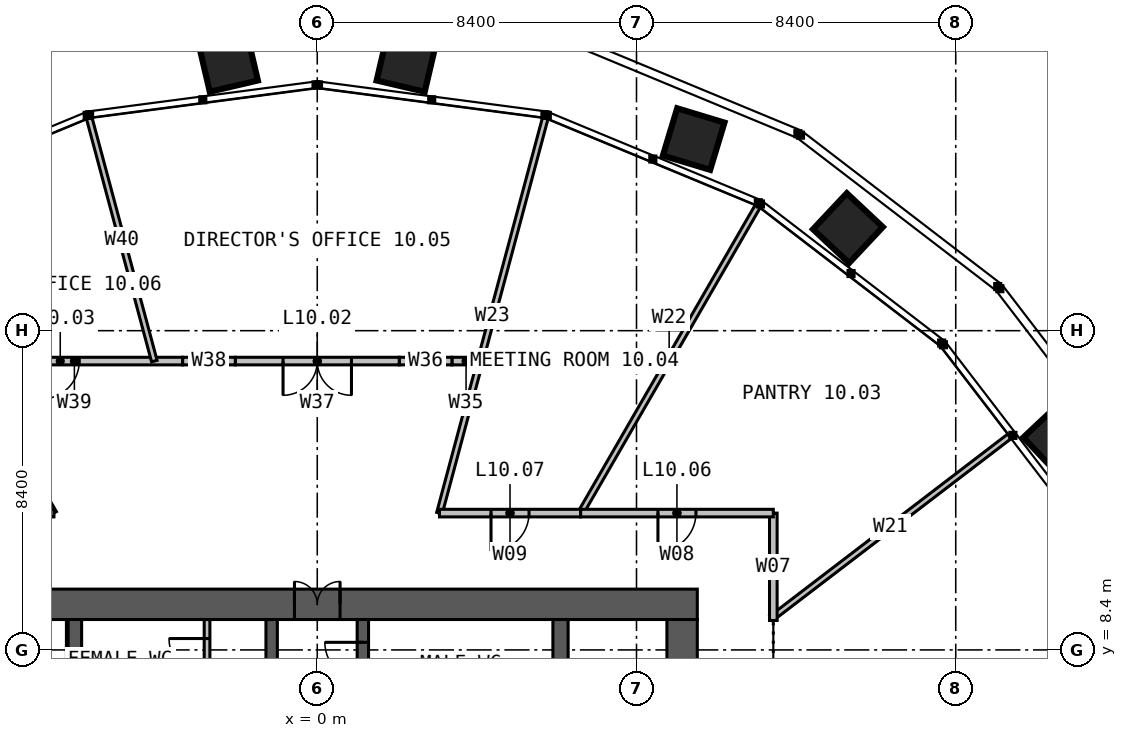
"""IFC4 building model, lengths in metres.
Left out: names, types, materials, properties, quantities, classifications, styles, units other than length and angle.
Written with IfcOpenShell. Run it as: python <this file> out.ifc"""

import sys

from ifc_helpers import new_model, si_unit, direction, frame, frame_2d, origin, place, context, subcontext, project, spatial, rectangle, extrude, element, fill, save


model = new_model("IFC4")
c1 = context("Model", 3, precision=1e-05, world=origin(), true_north=direction((0.0, 1.0)))
c2 = subcontext(c1, "Body", "Model", "MODEL_VIEW")
j1 = project(units=[si_unit("LENGTHUNIT", "METRE"), si_unit("PLANEANGLEUNIT", "RADIAN")], contexts=[c1])
p1 = place(None, origin())
s1 = spatial("IfcSite", under=j1, at=p1, CompositionType="ELEMENT")
p2 = place(p1, origin())
s2 = spatial("IfcBuilding", under=s1, at=p2, CompositionType="ELEMENT")
p3 = place(p2, frame((0.0, 0.0, 45.0)))
s3 = spatial("IfcBuildingStorey", under=s2, at=p3, CompositionType="ELEMENT", Elevation=45.0)
p4 = place(p3, frame((-10.0, 9.6, 0.0), z_axis=(0.0, 0.0, 1.0), x_axis=(1.0, 0.0, 0.0)))
e1 = element("IfcWall", 1, at=p4, inside=s3, PredefinedType="SOLIDWALL", context=c2, shape_type="SweptSolid", body=[
    extrude(rectangle(XDim=20.0, YDim=0.8, at=frame_2d((10.0, 0.0))), origin(), (0.0, 0.0, 1.0), 4.0),
])
p5 = place(p4, frame((9.4, 0.0, 0.0)))
e2 = element("IfcOpeningElement", 2, at=p5, cuts=e1, PredefinedType="OPENING", context=c2, shape_type="SweptSolid", body=[
    extrude(rectangle(XDim=1.2, YDim=2.2, at=frame_2d((0.6, 1.1))), frame((0.0, 0.41, 0.0), z_axis=(0.0, -1.0, 0.0), x_axis=(1.0, 0.0, 0.0)), (0.0, 0.0, 1.0), 0.82),
])
p6 = place(p3, frame((9.6, -9.2, 0.0), z_axis=(0.0, 0.0, 1.0), x_axis=(0.0, 1.0, 0.0)))
e3 = element("IfcWall", 3, at=p6, inside=s3, PredefinedType="SOLIDWALL", context=c2, shape_type="SweptSolid", body=[
    extrude(rectangle(XDim=18.4, YDim=0.8, at=frame_2d((9.2, 0.0))), origin(), (0.0, 0.0, 1.0), 4.0),
])
p7 = place(p3, frame((-6.4, -9.2, 0.0), z_axis=(0.0, 0.0, 1.0), x_axis=(0.0, 1.0, 0.0)))
e4 = element("IfcWall", 4, at=p7, inside=s3, PredefinedType="SOLIDWALL", context=c2, shape_type="SweptSolid", body=[
    extrude(rectangle(XDim=18.4, YDim=0.4, at=frame_2d((9.2, 0.0))), origin(), (0.0, 0.0, 1.0), 4.0),
])
p8 = place(p7, frame((8.7, 0.0, 0.0)))
e5 = element("IfcOpeningElement", 5, at=p8, cuts=e4, PredefinedType="OPENING", context=c2, shape_type="SweptSolid", body=[
    extrude(rectangle(XDim=1.0, YDim=2.2, at=frame_2d((0.5, 1.1))), frame((0.0, 0.21, 0.0), z_axis=(0.0, -1.0, 0.0), x_axis=(1.0, 0.0, 0.0)), (0.0, 0.0, 1.0), 0.42),
])
p9 = place(p3, frame((6.4, 9.2, 0.0), z_axis=(0.0, 0.0, 1.0), x_axis=(0.0, -1.0, 0.0)))
e6 = element("IfcWall", 6, at=p9, inside=s3, PredefinedType="SOLIDWALL", context=c2, shape_type="SweptSolid", body=[
    extrude(rectangle(XDim=18.4, YDim=0.4, at=frame_2d((9.2, 0.0))), origin(), (0.0, 0.0, 1.0), 4.0),
])
p10 = place(p9, frame((8.7, 0.0, 0.0)))
e7 = element("IfcOpeningElement", 7, at=p10, cuts=e6, PredefinedType="OPENING", context=c2, shape_type="SweptSolid", body=[
    extrude(rectangle(XDim=1.0, YDim=2.2, at=frame_2d((0.5, 1.1))), frame((0.0, 0.21, 0.0), z_axis=(0.0, -1.0, 0.0), x_axis=(1.0, 0.0, 0.0)), (0.0, 0.0, 1.0), 0.42),
])
p11 = place(p3, frame((-1.2, 1.45, 0.0), z_axis=(0.0, 0.0, 1.0), x_axis=(0.0, 1.0, 0.0)))
e8 = element("IfcWall", 8, at=p11, inside=s3, PredefinedType="SOLIDWALL", context=c2, shape_type="SweptSolid", body=[
    extrude(rectangle(XDim=7.75, YDim=0.3, at=frame_2d((3.875, 0.0))), origin(), (0.0, 0.0, 1.0), 4.0),
])
p12 = place(p11, frame((5.05, 0.0, 0.0)))
e9 = element("IfcOpeningElement", 9, at=p12, cuts=e8, PredefinedType="OPENING", context=c2, shape_type="SweptSolid", body=[
    extrude(rectangle(XDim=1.0, YDim=2.2, at=frame_2d((0.5, 1.1))), frame((0.0, 0.16, 0.0), z_axis=(0.0, -1.0, 0.0), x_axis=(1.0, 0.0, 0.0)), (0.0, 0.0, 1.0), 0.32),
])
p13 = place(p3, frame((1.2, 1.45, 0.0), z_axis=(0.0, 0.0, 1.0), x_axis=(0.0, 1.0, 0.0)))
e10 = element("IfcWall", 10, at=p13, inside=s3, PredefinedType="SOLIDWALL", context=c2, shape_type="SweptSolid", body=[
    extrude(rectangle(XDim=7.75, YDim=0.3, at=frame_2d((3.875, 0.0))), origin(), (0.0, 0.0, 1.0), 4.0),
])
p14 = place(p13, frame((3.8, 0.0, 0.0)))
e11 = element("IfcOpeningElement", 11, at=p14, cuts=e10, PredefinedType="OPENING", context=c2, shape_type="SweptSolid", body=[
    extrude(rectangle(XDim=1.0, YDim=2.2, at=frame_2d((0.5, 1.1))), frame((0.0, 0.16, 0.0), z_axis=(0.0, -1.0, 0.0), x_axis=(1.0, 0.0, 0.0)), (0.0, 0.0, 1.0), 0.32),
])
p15 = place(p13, frame((6.15, 0.0, 0.0)))
e12 = element("IfcOpeningElement", 12, at=p15, cuts=e10, PredefinedType="OPENING", context=c2, shape_type="SweptSolid", body=[
    extrude(rectangle(XDim=1.0, YDim=2.2, at=frame_2d((0.5, 1.1))), frame((0.0, 0.16, 0.0), z_axis=(0.0, -1.0, 0.0), x_axis=(1.0, 0.0, 0.0)), (0.0, 0.0, 1.0), 0.32),
])
p16 = place(p3, frame((-2.9, 4.75, 0.0), z_axis=(0.0, 0.0, 1.0), x_axis=(0.0, 1.0, 0.0)))
e13 = element("IfcWall", 13, at=p16, inside=s3, PredefinedType="PARTITIONING", context=c2, shape_type="SweptSolid", body=[
    extrude(rectangle(XDim=4.45, YDim=0.15, at=frame_2d((2.225, 0.0))), origin(), (0.0, 0.0, 1.0), 3.75),
])
p17 = place(p16, frame((2.95, 0.0, 0.0)))
e14 = element("IfcOpeningElement", 14, at=p17, cuts=e13, PredefinedType="OPENING", context=c2, shape_type="SweptSolid", body=[
    extrude(rectangle(XDim=1.0, YDim=2.2, at=frame_2d((0.5, 1.1))), frame((0.0, 0.085, 0.0), z_axis=(0.0, -1.0, 0.0), x_axis=(1.0, 0.0, 0.0)), (0.0, 0.0, 1.0), 0.17),
])
p18 = place(p16, frame((0.6, 0.0, 0.0)))
e15 = element("IfcOpeningElement", 15, at=p18, cuts=e13, PredefinedType="OPENING", context=c2, shape_type="SweptSolid", body=[
    extrude(rectangle(XDim=0.9, YDim=2.2, at=frame_2d((0.45, 1.1))), frame((0.0, 0.085, 0.0), z_axis=(0.0, -1.0, 0.0), x_axis=(1.0, 0.0, 0.0)), (0.0, 0.0, 1.0), 0.17),
])
p19 = place(p3, frame((11.954, 9.235, 0.0), z_axis=(0.0, 0.0, 1.0), x_axis=(0.794412378412, 0.607378772288, 0.0)))
e16 = element("IfcWall", 16, at=p19, inside=s3, PredefinedType="PARTITIONING", context=c2, shape_type="SweptSolid", body=[
    extrude(rectangle(XDim=7.876, YDim=0.15, at=frame_2d((3.938, 0.0))), origin(), (0.0, 0.0, 1.0), 2.79),
])
p20 = place(p3, frame((6.928, 12.0, 0.0), z_axis=(0.0, 0.0, 1.0), x_axis=(0.499994446179, 0.866028610261, 0.0)))
e17 = element("IfcWall", 17, at=p20, inside=s3, PredefinedType="PARTITIONING", context=c2, shape_type="SweptSolid", body=[
    extrude(rectangle(XDim=9.324, YDim=0.15, at=frame_2d((4.662, 0.0))), origin(), (0.0, 0.0, 1.0), 2.79),
])
p21 = place(p3, frame((3.215, 12.0, 0.0), z_axis=(0.0, 0.0, 1.0), x_axis=(0.258826463373, 0.965923838539, 0.0)))
e18 = element("IfcWall", 18, at=p21, inside=s3, PredefinedType="PARTITIONING", context=c2, shape_type="SweptSolid", body=[
    extrude(rectangle(XDim=10.757, YDim=0.15, at=frame_2d((5.378, 0.0))), origin(), (0.0, 0.0, 1.0), 2.79),
])
p22 = place(p3, frame((-6.928, 12.0, 0.0), z_axis=(0.0, 0.0, 1.0), x_axis=(-0.499994446179, 0.866028610261, 0.0)))
e19 = element("IfcWall", 19, at=p22, inside=s3, PredefinedType="PARTITIONING", context=c2, shape_type="SweptSolid", body=[
    extrude(rectangle(XDim=9.324, YDim=0.15, at=frame_2d((4.662, 0.0))), origin(), (0.0, 0.0, 1.0), 2.79),
])
p23 = place(p3, frame((12.0, 9.175, 0.0), z_axis=(0.0, 0.0, 1.0), x_axis=(0.0, 1.0, 0.0)))
e20 = element("IfcWall", 20, at=p23, inside=s3, PredefinedType="PARTITIONING", context=c2, shape_type="SweptSolid", body=[
    extrude(rectangle(XDim=2.825, YDim=0.2, at=frame_2d((1.413, 0.0))), origin(), (0.0, 0.0, 1.0), 3.8),
])
p24 = place(p3, frame((12.0, 12.0, 0.0), z_axis=(0.0, 0.0, 1.0), x_axis=(-1.0, 0.0, 0.0)))
e21 = element("IfcWall", 21, at=p24, inside=s3, PredefinedType="PARTITIONING", context=c2, shape_type="SweptSolid", body=[
    extrude(rectangle(XDim=5.072, YDim=0.2, at=frame_2d((2.536, 0.0))), origin(), (0.0, 0.0, 1.0), 3.8),
])
p25 = place(p24, frame((2.036, 0.0, 0.0)))
e22 = element("IfcOpeningElement", 22, at=p25, cuts=e21, PredefinedType="OPENING", context=c2, shape_type="SweptSolid", body=[
    extrude(rectangle(XDim=1.0, YDim=2.2, at=frame_2d((0.5, 1.1))), frame((0.0, 0.11, 0.0), z_axis=(0.0, -1.0, 0.0), x_axis=(1.0, 0.0, 0.0)), (0.0, 0.0, 1.0), 0.22),
])
p26 = place(p3, frame((6.928, 12.0, 0.0), z_axis=(0.0, 0.0, 1.0), x_axis=(-1.0, 0.0, 0.0)))
e23 = element("IfcWall", 23, at=p26, inside=s3, PredefinedType="PARTITIONING", context=c2, shape_type="SweptSolid", body=[
    extrude(rectangle(XDim=3.713, YDim=0.2, at=frame_2d((1.856, 0.0))), origin(), (0.0, 0.0, 1.0), 3.8),
])
p27 = place(p26, frame((1.356, 0.0, 0.0)))
e24 = element("IfcOpeningElement", 24, at=p27, cuts=e23, PredefinedType="OPENING", context=c2, shape_type="SweptSolid", body=[
    extrude(rectangle(XDim=1.0, YDim=2.2, at=frame_2d((0.5, 1.1))), frame((0.0, 0.11, 0.0), z_axis=(0.0, -1.0, 0.0), x_axis=(1.0, 0.0, 0.0)), (0.0, 0.0, 1.0), 0.22),
])
p28 = place(p3, frame((4.287, 16.0, 0.0), z_axis=(0.0, 0.0, 1.0), x_axis=(-1.0, 0.0, 0.0)))
e25 = element("IfcWall", 25, at=p28, inside=s3, PredefinedType="PARTITIONING", context=c2, shape_type="SweptSolid", body=[
    extrude(rectangle(XDim=0.743, YDim=0.2, at=frame_2d((0.372, 0.0))), origin(), (0.0, 0.0, 1.0), 3.8),
])
p29 = place(p3, frame((3.544, 16.0, 0.0), z_axis=(0.0, 0.0, 1.0), x_axis=(-1.0, 0.0, 0.0)))
e26 = element("IfcWall", 26, at=p29, inside=s3, PredefinedType="PARTITIONING", context=c2, shape_type="SweptSolid", body=[
    extrude(rectangle(XDim=1.387, YDim=0.2, at=frame_2d((0.693, 0.0))), origin(), (0.0, 0.0, 1.0), 3.4),
])
p30 = place(p3, frame((2.157, 16.0, 0.0), z_axis=(0.0, 0.0, 1.0), x_axis=(-1.0, 0.0, 0.0)))
e27 = element("IfcWall", 27, at=p30, inside=s3, PredefinedType="PARTITIONING", context=c2, shape_type="SweptSolid", body=[
    extrude(rectangle(XDim=4.314, YDim=0.2, at=frame_2d((2.157, 0.0))), origin(), (0.0, 0.0, 1.0), 3.8),
])
p31 = place(p30, frame((1.257, 0.0, 0.0)))
e28 = element("IfcOpeningElement", 28, at=p31, cuts=e27, PredefinedType="OPENING", context=c2, shape_type="SweptSolid", body=[
    extrude(rectangle(XDim=1.8, YDim=2.2, at=frame_2d((0.9, 1.1))), frame((0.0, 0.11, 0.0), z_axis=(0.0, -1.0, 0.0), x_axis=(1.0, 0.0, 0.0)), (0.0, 0.0, 1.0), 0.22),
])
p32 = place(p3, frame((-2.157, 16.0, 0.0), z_axis=(0.0, 0.0, 1.0), x_axis=(-1.0, 0.0, 0.0)))
e29 = element("IfcWall", 29, at=p32, inside=s3, PredefinedType="PARTITIONING", context=c2, shape_type="SweptSolid", body=[
    extrude(rectangle(XDim=1.387, YDim=0.2, at=frame_2d((0.693, 0.0))), origin(), (0.0, 0.0, 1.0), 3.4),
])
p33 = place(p3, frame((-3.544, 16.0, 0.0), z_axis=(0.0, 0.0, 1.0), x_axis=(-1.0, 0.0, 0.0)))
e30 = element("IfcWall", 30, at=p33, inside=s3, PredefinedType="PARTITIONING", context=c2, shape_type="SweptSolid", body=[
    extrude(rectangle(XDim=5.694, YDim=0.2, at=frame_2d((2.847, 0.0))), origin(), (0.0, 0.0, 1.0), 3.8),
])
p34 = place(p33, frame((2.719, 0.0, 0.0)))
e31 = element("IfcOpeningElement", 31, at=p34, cuts=e30, PredefinedType="OPENING", context=c2, shape_type="SweptSolid", body=[
    extrude(rectangle(XDim=1.0, YDim=2.2, at=frame_2d((0.5, 1.1))), frame((0.0, 0.11, 0.0), z_axis=(0.0, -1.0, 0.0), x_axis=(1.0, 0.0, 0.0)), (0.0, 0.0, 1.0), 0.22),
])
p35 = place(p3, frame((-4.287, 16.0, 0.0), z_axis=(0.0, 0.0, 1.0), x_axis=(-0.258833846319, 0.965921860194, 0.0)))
e32 = element("IfcWall", 32, at=p35, inside=s3, PredefinedType="PARTITIONING", context=c2, shape_type="SweptSolid", body=[
    extrude(rectangle(XDim=6.616, YDim=0.15, at=frame_2d((3.308, 0.0))), origin(), (0.0, 0.0, 1.0), 2.79),
])
p36 = place(p3, frame((-6.928, 12.0, 0.0), z_axis=(0.0, 0.0, 1.0), x_axis=(-1.0, 0.0, 0.0)))
e33 = element("IfcWall", 33, at=p36, inside=s3, PredefinedType="PARTITIONING", context=c2, shape_type="SweptSolid", body=[
    extrude(rectangle(XDim=5.072, YDim=0.2, at=frame_2d((2.536, 0.0))), origin(), (0.0, 0.0, 1.0), 3.8),
])
p37 = place(p36, frame((2.036, 0.0, 0.0)))
e34 = element("IfcOpeningElement", 34, at=p37, cuts=e33, PredefinedType="OPENING", context=c2, shape_type="SweptSolid", body=[
    extrude(rectangle(XDim=1.0, YDim=2.2, at=frame_2d((0.5, 1.1))), frame((0.0, 0.11, 0.0), z_axis=(0.0, -1.0, 0.0), x_axis=(1.0, 0.0, 0.0)), (0.0, 0.0, 1.0), 0.22),
])
p38 = place(p5, origin())
e35 = element("IfcDoor", 35, at=p38, inside=s3, OperationType="DOUBLE_DOOR_SINGLE_SWING", PredefinedType="DOOR", context=c2, shape_type="SweptSolid", body=[
    extrude(rectangle(XDim=1.2, YDim=2.2, at=frame_2d((0.6, 1.1))), frame((0.0, 0.025, 0.0), z_axis=(0.0, -1.0, 0.0), x_axis=(1.0, 0.0, 0.0)), (0.0, 0.0, 1.0), 0.05),
])
fill(e2, e35)
p39 = place(p15, origin())
e36 = element("IfcDoor", 36, at=p39, inside=s3, OperationType="SINGLE_SWING_RIGHT", PredefinedType="DOOR", context=c2, shape_type="SweptSolid", body=[
    extrude(rectangle(XDim=1.0, YDim=2.2, at=frame_2d((0.5, 1.1))), frame((0.0, 0.025, 0.0), z_axis=(0.0, -1.0, 0.0), x_axis=(1.0, 0.0, 0.0)), (0.0, 0.0, 1.0), 0.05),
])
fill(e12, e36)
p40 = place(p17, origin())
e37 = element("IfcDoor", 37, at=p40, inside=s3, OperationType="SINGLE_SWING_RIGHT", PredefinedType="DOOR", context=c2, shape_type="SweptSolid", body=[
    extrude(rectangle(XDim=1.0, YDim=2.2, at=frame_2d((0.5, 1.1))), frame((0.0, 0.025, 0.0), z_axis=(0.0, -1.0, 0.0), x_axis=(1.0, 0.0, 0.0)), (0.0, 0.0, 1.0), 0.05),
])
fill(e14, e37)
p41 = place(p25, origin())
e38 = element("IfcDoor", 38, at=p41, inside=s3, OperationType="SINGLE_SWING_RIGHT", PredefinedType="DOOR", context=c2, shape_type="SweptSolid", body=[
    extrude(rectangle(XDim=1.0, YDim=2.2, at=frame_2d((0.5, 1.1))), frame((0.0, 0.025, 0.0), z_axis=(0.0, -1.0, 0.0), x_axis=(1.0, 0.0, 0.0)), (0.0, 0.0, 1.0), 0.05),
])
fill(e22, e38)
p42 = place(p27, origin())
e39 = element("IfcDoor", 39, at=p42, inside=s3, OperationType="SINGLE_SWING_RIGHT", PredefinedType="DOOR", context=c2, shape_type="SweptSolid", body=[
    extrude(rectangle(XDim=1.0, YDim=2.2, at=frame_2d((0.5, 1.1))), frame((0.0, 0.025, 0.0), z_axis=(0.0, -1.0, 0.0), x_axis=(1.0, 0.0, 0.0)), (0.0, 0.0, 1.0), 0.05),
])
fill(e24, e39)
p43 = place(p31, origin())
e40 = element("IfcDoor", 40, at=p43, inside=s3, OperationType="DOUBLE_DOOR_SINGLE_SWING", PredefinedType="DOOR", context=c2, shape_type="SweptSolid", body=[
    extrude(rectangle(XDim=1.8, YDim=2.2, at=frame_2d((0.9, 1.1))), frame((0.0, 0.025, 0.0), z_axis=(0.0, -1.0, 0.0), x_axis=(1.0, 0.0, 0.0)), (0.0, 0.0, 1.0), 0.05),
])
fill(e28, e40)
p44 = place(p34, origin())
e41 = element("IfcDoor", 41, at=p44, inside=s3, OperationType="SINGLE_SWING_RIGHT", PredefinedType="DOOR", context=c2, shape_type="SweptSolid", body=[
    extrude(rectangle(XDim=1.0, YDim=2.2, at=frame_2d((0.5, 1.1))), frame((0.0, 0.025, 0.0), z_axis=(0.0, -1.0, 0.0), x_axis=(1.0, 0.0, 0.0)), (0.0, 0.0, 1.0), 0.05),
])
fill(e31, e41)
save(model, sys.argv[1])
